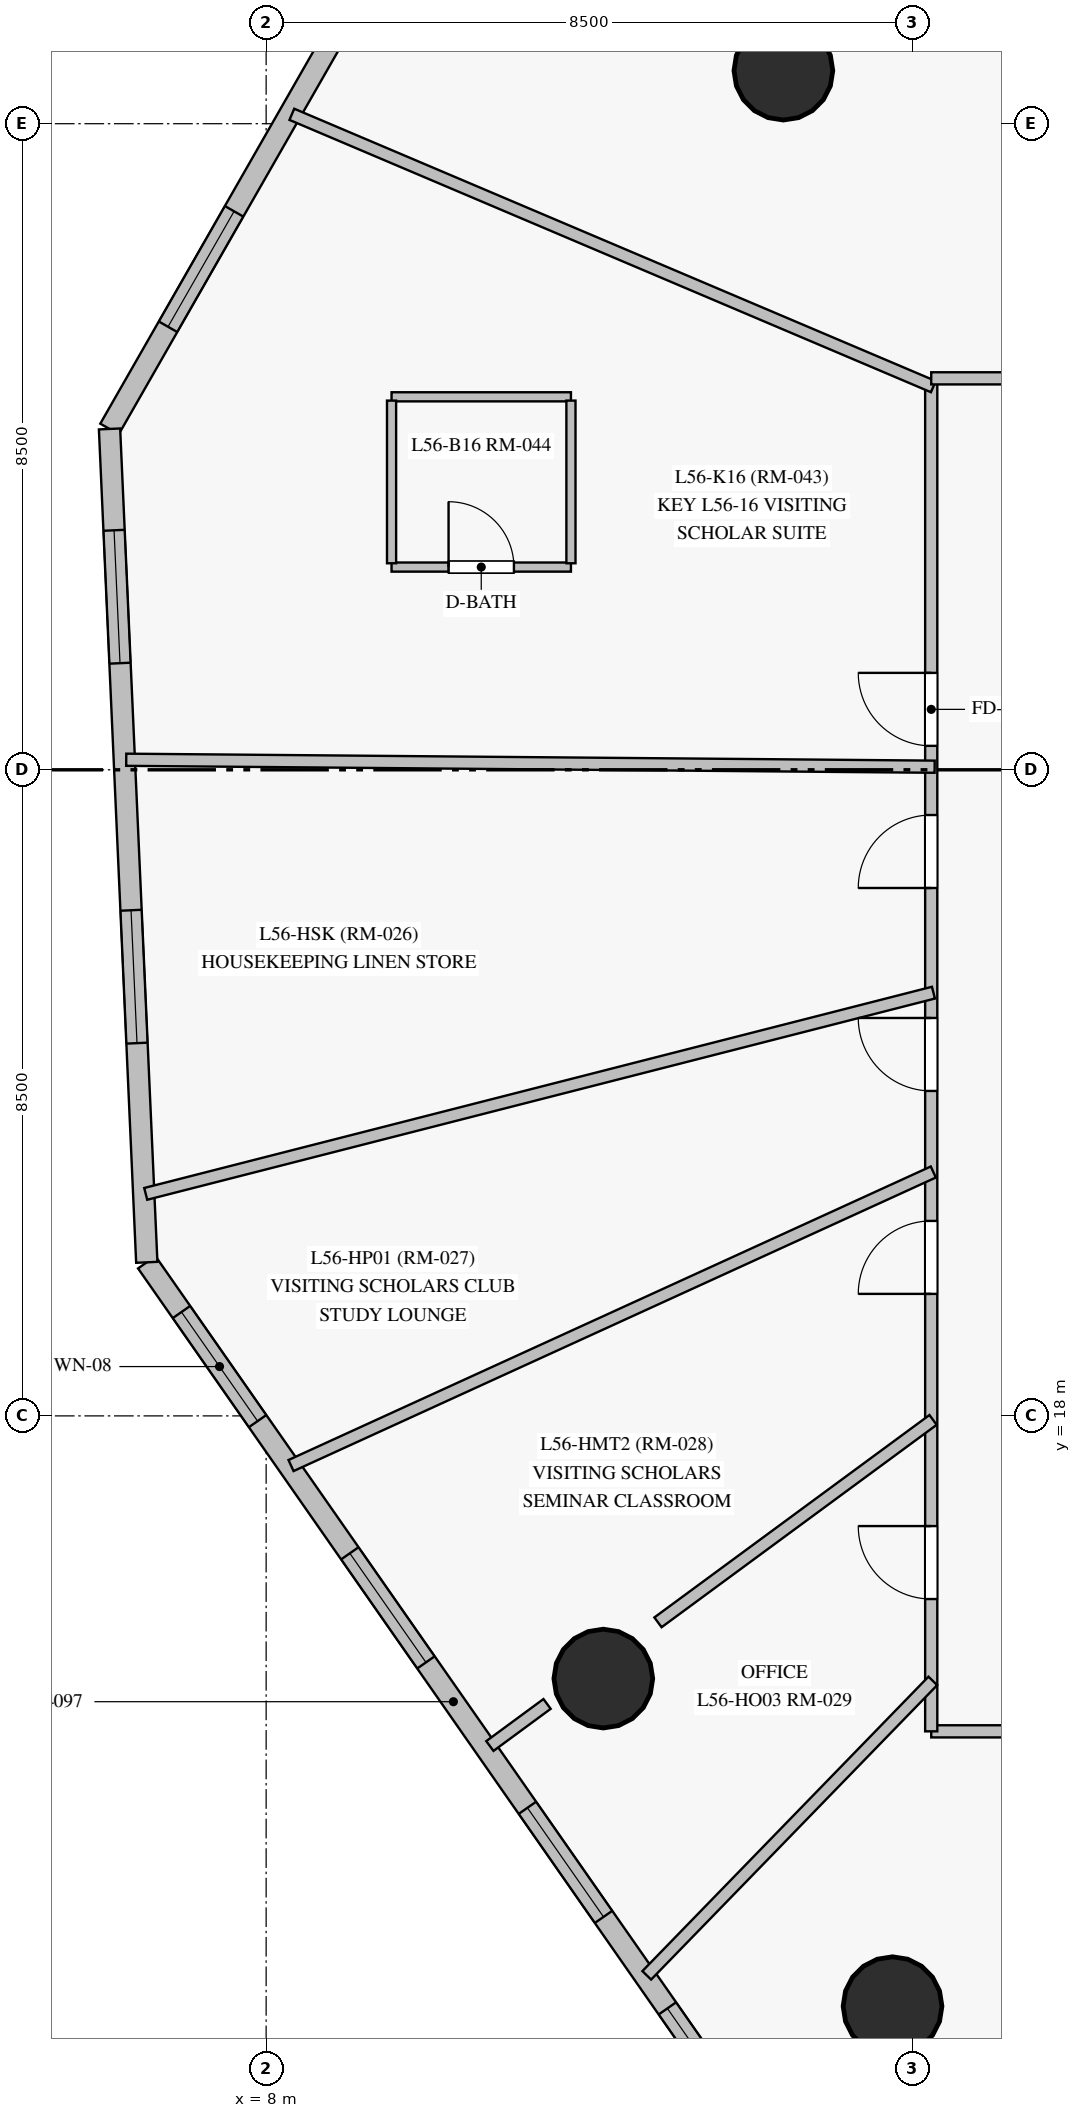
"""IFC4 building model, lengths in metres.
Left out: names, types, materials, properties, quantities, classifications, styles, units other than length and angle.
Written with IfcOpenShell. Run it as: python <this file> out.ifc"""

import sys

from ifc_helpers import new_model, si_unit, direction, frame, frame_2d, origin, origin_with_axes, origin_2d, place, context, subcontext, project, spatial, rectangle, circle, extrude, source, transform, mapped, element, fill, save


model = new_model("IFC4")
c1 = context("Model", 3, precision=1e-05, world=origin(), true_north=direction((0.0, 1.0)))
c2 = subcontext(c1, "Body", "Model", "MODEL_VIEW")
j1 = project(units=[si_unit("LENGTHUNIT", "METRE"), si_unit("PLANEANGLEUNIT", "RADIAN")], contexts=[c1])
p1 = place(None, origin())
s1 = spatial("IfcSite", under=j1, at=p1, CompositionType="ELEMENT")
p2 = place(p1, origin())
s2 = spatial("IfcBuilding", under=s1, at=p2, CompositionType="ELEMENT")
p3 = place(p2, frame((0.0, 0.0, 193.15)))
s3 = spatial("IfcBuildingStorey", under=s2, at=p3, CompositionType="ELEMENT", Elevation=193.15)
m1 = source(origin_with_axes(), c2, "Body", "SweptSolid", [
    extrude(circle(Radius=0.65, at=origin_2d()), origin(), (0.0, 0.0, 1.0), 3.05),
])
for number, where, z_axis, x_axis in (
    (1, (14.805, 35.698, 0.0), (0.0, 0.0, 1.0), (1.0, 0.0, 0.0)),
    (2, (12.436, 14.544, 0.0), (0.0, 0.0, 1.0), (1.0, 0.0, 0.0)),
    (3, (16.241, 10.234, 0.0), (0.0, 0.0, 1.0), (1.0, 0.0, 0.0)),
):
    element("IfcColumn", number, at=place(p3, frame(where, z_axis=z_axis, x_axis=x_axis)), inside=s3, PredefinedType="COLUMN", context=c2, shape_type="MappedRepresentation", body=[
        mapped(m1, transform((0.0, 0.0, 0.0), scale=1.0)),
    ])
p4 = place(p3, frame((6.43, 20.02, 0.0), z_axis=(0.0, 0.0, 1.0), x_axis=(0.57226340273, -0.820069873789, 0.0)))
e4 = element("IfcWall", 4, at=p4, inside=s3, PredefinedType="SOLIDWALL", context=c2, shape_type="SweptSolid", body=[
    extrude(rectangle(XDim=14.097, YDim=0.28, at=frame_2d((7.049, 0.0))), origin(), (0.0, 0.0, 1.0), 2.825),
])
p5 = place(p4, frame((0.797, 0.0, 0.85)))
e5 = element("IfcOpeningElement", 5, at=p5, cuts=e4, PredefinedType="OPENING", context=c2, shape_type="SweptSolid", body=[
    extrude(rectangle(XDim=1.75, YDim=1.65, at=frame_2d((0.875, 0.825))), frame((0.0, 0.15, 0.0), z_axis=(0.0, -1.0, 0.0), x_axis=(1.0, 0.0, 0.0)), (0.0, 0.0, 1.0), 0.3),
])
p6 = place(p4, frame((4.668, 0.0, 0.85)))
e6 = element("IfcOpeningElement", 6, at=p6, cuts=e4, PredefinedType="OPENING", context=c2, shape_type="SweptSolid", body=[
    extrude(rectangle(XDim=1.75, YDim=1.65, at=frame_2d((0.875, 0.825))), frame((0.0, 0.15, 0.0), z_axis=(0.0, -1.0, 0.0), x_axis=(1.0, 0.0, 0.0)), (0.0, 0.0, 1.0), 0.3),
])
p7 = place(p4, frame((8.751, 0.0, 0.85)))
e7 = element("IfcOpeningElement", 7, at=p7, cuts=e4, PredefinedType="OPENING", context=c2, shape_type="SweptSolid", body=[
    extrude(rectangle(XDim=1.75, YDim=1.65, at=frame_2d((0.875, 0.825))), frame((0.0, 0.15, 0.0), z_axis=(0.0, -1.0, 0.0), x_axis=(1.0, 0.0, 0.0)), (0.0, 0.0, 1.0), 0.3),
])
p8 = place(p4, frame((11.969, 0.0, 0.85)))
e8 = element("IfcOpeningElement", 8, at=p8, cuts=e4, PredefinedType="OPENING", context=c2, shape_type="SweptSolid", body=[
    extrude(rectangle(XDim=1.55, YDim=1.65, at=frame_2d((0.775, 0.825))), frame((0.0, 0.15, 0.0), z_axis=(0.0, -1.0, 0.0), x_axis=(1.0, 0.0, 0.0)), (0.0, 0.0, 1.0), 0.3),
])
p9 = place(p3, frame((12.943, 43.219, 0.0), z_axis=(0.0, 0.0, 1.0), x_axis=(-0.496778519018, -0.867877354839, 0.0)))
e9 = element("IfcWall", 9, at=p9, inside=s3, PredefinedType="SOLIDWALL", context=c2, shape_type="SweptSolid", body=[
    extrude(rectangle(XDim=14.097, YDim=0.28, at=frame_2d((7.049, 0.0))), origin(), (0.0, 0.0, 1.0), 2.825),
])
p10 = place(p9, frame((1.657, 0.0, 0.85)))
e10 = element("IfcOpeningElement", 10, at=p10, cuts=e9, PredefinedType="OPENING", context=c2, shape_type="SweptSolid", body=[
    extrude(rectangle(XDim=1.75, YDim=1.65, at=frame_2d((0.875, 0.825))), frame((0.0, 0.15, 0.0), z_axis=(0.0, -1.0, 0.0), x_axis=(1.0, 0.0, 0.0)), (0.0, 0.0, 1.0), 0.3),
])
p11 = place(p9, frame((5.962, 0.0, 0.85)))
e11 = element("IfcOpeningElement", 11, at=p11, cuts=e9, PredefinedType="OPENING", context=c2, shape_type="SweptSolid", body=[
    extrude(rectangle(XDim=1.75, YDim=1.65, at=frame_2d((0.875, 0.825))), frame((0.0, 0.15, 0.0), z_axis=(0.0, -1.0, 0.0), x_axis=(1.0, 0.0, 0.0)), (0.0, 0.0, 1.0), 0.3),
])
p12 = place(p9, frame((10.798, 0.0, 0.85)))
e12 = element("IfcOpeningElement", 12, at=p12, cuts=e9, PredefinedType="OPENING", context=c2, shape_type="SweptSolid", body=[
    extrude(rectangle(XDim=1.75, YDim=1.65, at=frame_2d((0.875, 0.825))), frame((0.0, 0.15, 0.0), z_axis=(0.0, -1.0, 0.0), x_axis=(1.0, 0.0, 0.0)), (0.0, 0.0, 1.0), 0.3),
])
p13 = place(p3, frame((5.94, 30.984, 0.0), z_axis=(0.0, 0.0, 1.0), x_axis=(0.044646804319, -0.999002834262, 0.0)))
e13 = element("IfcWall", 13, at=p13, inside=s3, PredefinedType="SOLIDWALL", context=c2, shape_type="SweptSolid", body=[
    extrude(rectangle(XDim=10.975, YDim=0.28, at=frame_2d((5.487, 0.0))), origin(), (0.0, 0.0, 1.0), 2.825),
])
p14 = place(p13, frame((1.335, 0.0, 0.85)))
e14 = element("IfcOpeningElement", 14, at=p14, cuts=e13, PredefinedType="OPENING", context=c2, shape_type="SweptSolid", body=[
    extrude(rectangle(XDim=1.75, YDim=1.65, at=frame_2d((0.875, 0.825))), frame((0.0, 0.15, 0.0), z_axis=(0.0, -1.0, 0.0), x_axis=(1.0, 0.0, 0.0)), (0.0, 0.0, 1.0), 0.3),
])
p15 = place(p13, frame((6.338, 0.0, 0.85)))
e15 = element("IfcOpeningElement", 15, at=p15, cuts=e13, PredefinedType="OPENING", context=c2, shape_type="SweptSolid", body=[
    extrude(rectangle(XDim=1.75, YDim=1.65, at=frame_2d((0.875, 0.825))), frame((0.0, 0.15, 0.0), z_axis=(0.0, -1.0, 0.0), x_axis=(1.0, 0.0, 0.0)), (0.0, 0.0, 1.0), 0.3),
])
p16 = place(p3, frame((41.8, 13.85, 0.0), z_axis=(0.0, 0.0, 1.0), x_axis=(-1.0, 0.0, 0.0)))
e16 = element("IfcWall", 16, at=p16, inside=s3, PredefinedType="PARTITIONING", context=c2, shape_type="SweptSolid", body=[
    extrude(rectangle(XDim=25.05, YDim=0.16, at=frame_2d((12.525, 0.0))), origin(), (0.0, 0.0, 1.0), 2.275),
])
p17 = place(p16, frame((5.788, 0.0, 0.0)))
e17 = element("IfcOpeningElement", 17, at=p17, cuts=e16, PredefinedType="OPENING", context=c2, shape_type="SweptSolid", body=[
    extrude(rectangle(XDim=0.96, YDim=2.15, at=frame_2d((0.48, 1.075))), frame((0.0, 0.09, 0.0), z_axis=(0.0, -1.0, 0.0), x_axis=(1.0, 0.0, 0.0)), (0.0, 0.0, 1.0), 0.18),
])
p18 = place(p16, frame((18.802, 0.0, 0.0)))
e18 = element("IfcOpeningElement", 18, at=p18, cuts=e16, PredefinedType="OPENING", context=c2, shape_type="SweptSolid", body=[
    extrude(rectangle(XDim=0.96, YDim=2.15, at=frame_2d((0.48, 1.075))), frame((0.0, 0.09, 0.0), z_axis=(0.0, -1.0, 0.0), x_axis=(1.0, 0.0, 0.0)), (0.0, 0.0, 1.0), 0.18),
])
p19 = place(p16, frame((15.808, 0.0, 0.0)))
e19 = element("IfcOpeningElement", 19, at=p19, cuts=e16, PredefinedType="OPENING", context=c2, shape_type="SweptSolid", body=[
    extrude(rectangle(XDim=0.96, YDim=2.15, at=frame_2d((0.48, 1.075))), frame((0.0, 0.09, 0.0), z_axis=(0.0, -1.0, 0.0), x_axis=(1.0, 0.0, 0.0)), (0.0, 0.0, 1.0), 0.18),
])
p20 = place(p16, frame((13.26, 0.0, 0.0)))
e20 = element("IfcOpeningElement", 20, at=p20, cuts=e16, PredefinedType="OPENING", context=c2, shape_type="SweptSolid", body=[
    extrude(rectangle(XDim=0.96, YDim=2.15, at=frame_2d((0.48, 1.075))), frame((0.0, 0.09, 0.0), z_axis=(0.0, -1.0, 0.0), x_axis=(1.0, 0.0, 0.0)), (0.0, 0.0, 1.0), 0.18),
])
p21 = place(p16, frame((11.46, 0.0, 0.0)))
e21 = element("IfcOpeningElement", 21, at=p21, cuts=e16, PredefinedType="OPENING", context=c2, shape_type="SweptSolid", body=[
    extrude(rectangle(XDim=0.96, YDim=2.15, at=frame_2d((0.48, 1.075))), frame((0.0, 0.09, 0.0), z_axis=(0.0, -1.0, 0.0), x_axis=(1.0, 0.0, 0.0)), (0.0, 0.0, 1.0), 0.18),
])
p22 = place(p16, frame((8.202, 0.0, 0.0)))
e22 = element("IfcOpeningElement", 22, at=p22, cuts=e16, PredefinedType="OPENING", context=c2, shape_type="SweptSolid", body=[
    extrude(rectangle(XDim=0.96, YDim=2.15, at=frame_2d((0.48, 1.075))), frame((0.0, 0.09, 0.0), z_axis=(0.0, -1.0, 0.0), x_axis=(1.0, 0.0, 0.0)), (0.0, 0.0, 1.0), 0.18),
])
p23 = place(p3, frame((16.75, 13.85, 0.0), z_axis=(0.0, 0.0, 1.0), x_axis=(0.0, 1.0, 0.0)))
e23 = element("IfcWall", 23, at=p23, inside=s3, PredefinedType="PARTITIONING", context=c2, shape_type="SweptSolid", body=[
    extrude(rectangle(XDim=17.8, YDim=0.16, at=frame_2d((8.9, 0.0))), origin(), (0.0, 0.0, 1.0), 2.375),
])
p24 = place(p23, frame((12.965, 0.0, 0.0)))
e24 = element("IfcOpeningElement", 24, at=p24, cuts=e23, PredefinedType="OPENING", context=c2, shape_type="SweptSolid", body=[
    extrude(rectangle(XDim=0.96, YDim=2.15, at=frame_2d((0.48, 1.075))), frame((0.0, 0.09, 0.0), z_axis=(0.0, -1.0, 0.0), x_axis=(1.0, 0.0, 0.0)), (0.0, 0.0, 1.0), 0.18),
])
p25 = place(p23, frame((11.095, 0.0, 0.0)))
e25 = element("IfcOpeningElement", 25, at=p25, cuts=e23, PredefinedType="OPENING", context=c2, shape_type="SweptSolid", body=[
    extrude(rectangle(XDim=0.96, YDim=2.15, at=frame_2d((0.48, 1.075))), frame((0.0, 0.09, 0.0), z_axis=(0.0, -1.0, 0.0), x_axis=(1.0, 0.0, 0.0)), (0.0, 0.0, 1.0), 0.18),
])
p26 = place(p23, frame((8.425, 0.0, 0.0)))
e26 = element("IfcOpeningElement", 26, at=p26, cuts=e23, PredefinedType="OPENING", context=c2, shape_type="SweptSolid", body=[
    extrude(rectangle(XDim=0.96, YDim=2.15, at=frame_2d((0.48, 1.075))), frame((0.0, 0.09, 0.0), z_axis=(0.0, -1.0, 0.0), x_axis=(1.0, 0.0, 0.0)), (0.0, 0.0, 1.0), 0.18),
])
p27 = place(p23, frame((5.755, 0.0, 0.0)))
e27 = element("IfcOpeningElement", 27, at=p27, cuts=e23, PredefinedType="OPENING", context=c2, shape_type="SweptSolid", body=[
    extrude(rectangle(XDim=0.96, YDim=2.15, at=frame_2d((0.48, 1.075))), frame((0.0, 0.09, 0.0), z_axis=(0.0, -1.0, 0.0), x_axis=(1.0, 0.0, 0.0)), (0.0, 0.0, 1.0), 0.18),
])
p28 = place(p23, frame((1.74, 0.0, 0.0)))
e28 = element("IfcOpeningElement", 28, at=p28, cuts=e23, PredefinedType="OPENING", context=c2, shape_type="SweptSolid", body=[
    extrude(rectangle(XDim=0.96, YDim=2.15, at=frame_2d((0.48, 1.075))), frame((0.0, 0.09, 0.0), z_axis=(0.0, -1.0, 0.0), x_axis=(1.0, 0.0, 0.0)), (0.0, 0.0, 1.0), 0.18),
])
p29 = place(p3, frame((16.779, 23.568, 0.0), z_axis=(0.0, 0.0, 1.0), x_axis=(-0.968887786479, -0.247500418611, 0.0)))
e29 = element("IfcWall", 29, at=p29, inside=s3, PredefinedType="PARTITIONING", context=c2, shape_type="SweptSolid", body=[
    extrude(rectangle(XDim=10.696, YDim=0.16, at=frame_2d((5.348, 0.0))), origin(), (0.0, 0.0, 1.0), 2.825),
])
p30 = place(p3, frame((6.159, 26.632, 0.0), z_axis=(0.0, 0.0, 1.0), x_axis=(0.999963152013, -0.008584556843, 0.0)))
e30 = element("IfcWall", 30, at=p30, inside=s3, PredefinedType="PARTITIONING", context=c2, shape_type="SweptSolid", body=[
    extrude(rectangle(XDim=10.636, YDim=0.16, at=frame_2d((5.318, 0.0))), origin(), (0.0, 0.0, 1.0), 2.825),
])
p31 = place(p3, frame((16.777, 21.208, 0.0), z_axis=(0.0, 0.0, 1.0), x_axis=(-0.909515920055, -0.415669088539, 0.0)))
e31 = element("IfcWall", 31, at=p31, inside=s3, PredefinedType="PARTITIONING", context=c2, shape_type="SweptSolid", body=[
    extrude(rectangle(XDim=9.291, YDim=0.16, at=frame_2d((4.645, 0.0))), origin(), (0.0, 0.0, 1.0), 2.825),
])
p32 = place(p3, frame((16.778, 31.541, 0.0), z_axis=(0.0, 0.0, 1.0), x_axis=(-0.920503138741, 0.390735168072, 0.0)))
e32 = element("IfcWall", 32, at=p32, inside=s3, PredefinedType="PARTITIONING", context=c2, shape_type="SweptSolid", body=[
    extrude(rectangle(XDim=9.168, YDim=0.16, at=frame_2d((4.584, 0.0))), origin(), (0.0, 0.0, 1.0), 2.825),
])
p33 = place(p3, frame((16.771, 14.514, 0.0), z_axis=(0.0, 0.0, 1.0), x_axis=(-0.696840168134, -0.717226449648, 0.0)))
e33 = element("IfcWall", 33, at=p33, inside=s3, PredefinedType="PARTITIONING", context=c2, shape_type="SweptSolid", body=[
    extrude(rectangle(XDim=5.401, YDim=0.16, at=frame_2d((2.701, 0.0))), origin(), (0.0, 0.0, 1.0), 2.825),
])
p34 = place(p3, frame((16.774, 17.947, 0.0), z_axis=(0.0, 0.0, 1.0), x_axis=(-0.805443512659, -0.592672546956, 0.0)))
e34 = element("IfcWall", 34, at=p34, inside=s3, PredefinedType="PARTITIONING", context=c2, shape_type="SweptSolid", body=[
    extrude(rectangle(XDim=4.493, YDim=0.16, at=frame_2d((2.247, 0.0))), origin(), (0.0, 0.0, 1.0), 2.275),
])
p35 = place(p3, frame((16.75, 31.65, 0.0), z_axis=(0.0, 0.0, 1.0), x_axis=(1.0, 0.0, 0.0)))
e35 = element("IfcWall", 35, at=p35, inside=s3, PredefinedType="PARTITIONING", context=c2, shape_type="SweptSolid", body=[
    extrude(rectangle(XDim=2.543, YDim=0.16, at=frame_2d((1.271, 0.0))), origin(), (0.0, 0.0, 1.0), 2.825),
])
p36 = place(p3, frame((9.65, 29.167, 0.0), z_axis=(0.0, 0.0, 1.0), x_axis=(1.0, 0.0, 0.0)))
e36 = element("IfcWall", 36, at=p36, inside=s3, PredefinedType="PARTITIONING", context=c2, shape_type="SweptSolid", body=[
    extrude(rectangle(XDim=2.36, YDim=0.12, at=frame_2d((1.18, 0.0))), origin(), (0.0, 0.0, 1.0), 2.825),
])
p37 = place(p36, frame((0.75, 0.0, 0.0)))
e37 = element("IfcOpeningElement", 37, at=p37, cuts=e36, PredefinedType="OPENING", context=c2, shape_type="SweptSolid", body=[
    extrude(rectangle(XDim=0.86, YDim=2.1, at=frame_2d((0.43, 1.05))), frame((0.0, 0.07, 0.0), z_axis=(0.0, -1.0, 0.0), x_axis=(1.0, 0.0, 0.0)), (0.0, 0.0, 1.0), 0.14),
])
p38 = place(p3, frame((12.01, 31.407, 0.0), z_axis=(0.0, 0.0, 1.0), x_axis=(-1.0, 0.0, 0.0)))
e38 = element("IfcWall", 38, at=p38, inside=s3, PredefinedType="PARTITIONING", context=c2, shape_type="SweptSolid", body=[
    extrude(rectangle(XDim=2.36, YDim=0.12, at=frame_2d((1.18, 0.0))), origin(), (0.0, 0.0, 1.0), 2.825),
])
for number, where, z_axis, x_axis in (
    (39, (12.01, 29.217, 0.0), (0.0, 0.0, 1.0), (0.0, 1.0, 0.0)),
    (40, (9.65, 31.357, 0.0), (0.0, 0.0, 1.0), (0.0, -1.0, 0.0)),
):
    element("IfcWall", number, at=place(p3, frame(where, z_axis=z_axis, x_axis=x_axis)), inside=s3, PredefinedType="PARTITIONING", context=c2, shape_type="SweptSolid", body=[
        extrude(rectangle(XDim=2.14, YDim=0.12, at=frame_2d((1.07, 0.0))), origin(), (0.0, 0.0, 1.0), 2.825),
    ])
p39 = place(p3, frame((11.696, 14.21, 0.0), z_axis=(0.0, 0.0, 1.0), x_axis=(-0.805423517146, -0.59269971995, 0.0)))
e41 = element("IfcWall", 41, at=p39, inside=s3, PredefinedType="PARTITIONING", context=c2, shape_type="SweptSolid", body=[
    extrude(rectangle(XDim=0.934, YDim=0.16, at=frame_2d((0.467, 0.0))), origin(), (0.0, 0.0, 1.0), 2.825),
])
m2 = source(origin_with_axes(), c2, "Body", "SweptSolid", [
    extrude(rectangle(XDim=1.75, YDim=1.65, at=frame_2d((0.875, 0.825))), frame((0.0, 0.03, 0.0), z_axis=(0.0, -1.0, 0.0), x_axis=(1.0, 0.0, 0.0)), (0.0, 0.0, 1.0), 0.06),
])
p40 = place(p5, origin())
e42 = element("IfcWindow", 42, at=p40, inside=s3, PartitioningType="SINGLE_PANEL", PredefinedType="WINDOW", context=c2, shape_type="MappedRepresentation", body=[
    mapped(m2, transform((0.0, 0.0, 0.0), scale=1.0)),
])
fill(e5, e42)
p41 = place(p6, origin())
e43 = element("IfcWindow", 43, at=p41, inside=s3, PartitioningType="SINGLE_PANEL", PredefinedType="WINDOW", context=c2, shape_type="MappedRepresentation", body=[
    mapped(m2, transform((0.0, 0.0, 0.0), scale=1.0)),
])
fill(e6, e43)
p42 = place(p7, origin())
e44 = element("IfcWindow", 44, at=p42, inside=s3, PartitioningType="SINGLE_PANEL", PredefinedType="WINDOW", context=c2, shape_type="MappedRepresentation", body=[
    mapped(m2, transform((0.0, 0.0, 0.0), scale=1.0)),
])
fill(e7, e44)
m3 = source(origin_with_axes(), c2, "Body", "SweptSolid", [
    extrude(rectangle(XDim=1.55, YDim=1.65, at=frame_2d((0.775, 0.825))), frame((0.0, 0.03, 0.0), z_axis=(0.0, -1.0, 0.0), x_axis=(1.0, 0.0, 0.0)), (0.0, 0.0, 1.0), 0.06),
])
p43 = place(p8, origin())
e45 = element("IfcWindow", 45, at=p43, inside=s3, PartitioningType="SINGLE_PANEL", PredefinedType="WINDOW", context=c2, shape_type="MappedRepresentation", body=[
    mapped(m3, transform((0.0, 0.0, 0.0), scale=1.0)),
])
fill(e8, e45)
p44 = place(p12, origin())
e46 = element("IfcWindow", 46, at=p44, inside=s3, PartitioningType="SINGLE_PANEL", PredefinedType="WINDOW", context=c2, shape_type="MappedRepresentation", body=[
    mapped(m2, transform((0.0, 0.0, 0.0), scale=1.0)),
])
fill(e12, e46)
p45 = place(p14, origin())
e47 = element("IfcWindow", 47, at=p45, inside=s3, PartitioningType="SINGLE_PANEL", PredefinedType="WINDOW", context=c2, shape_type="MappedRepresentation", body=[
    mapped(m2, transform((0.0, 0.0, 0.0), scale=1.0)),
])
fill(e14, e47)
p46 = place(p15, origin())
e48 = element("IfcWindow", 48, at=p46, inside=s3, PartitioningType="SINGLE_PANEL", PredefinedType="WINDOW", context=c2, shape_type="MappedRepresentation", body=[
    mapped(m2, transform((0.0, 0.0, 0.0), scale=1.0)),
])
fill(e15, e48)
m4 = source(origin_with_axes(), c2, "Body", "SweptSolid", [
    extrude(rectangle(XDim=0.86, YDim=2.1, at=frame_2d((0.43, 1.05))), frame((0.0, 0.025, 0.0), z_axis=(0.0, -1.0, 0.0), x_axis=(1.0, 0.0, 0.0)), (0.0, 0.0, 1.0), 0.05),
])
p47 = place(p37, origin())
e49 = element("IfcDoor", 49, at=p47, inside=s3, OperationType="SINGLE_SWING_LEFT", PredefinedType="DOOR", context=c2, shape_type="MappedRepresentation", body=[
    mapped(m4, transform((0.0, 0.0, 0.0), scale=1.0)),
])
fill(e37, e49)
m5 = source(origin_with_axes(), c2, "Body", "SweptSolid", [
    extrude(rectangle(XDim=0.96, YDim=2.15, at=frame_2d((0.48, 1.075))), frame((0.0, 0.025, 0.0), z_axis=(0.0, -1.0, 0.0), x_axis=(1.0, 0.0, 0.0)), (0.0, 0.0, 1.0), 0.05),
])
p48 = place(p24, origin())
e50 = element("IfcDoor", 50, at=p48, inside=s3, OperationType="SINGLE_SWING_RIGHT", PredefinedType="DOOR", context=c2, shape_type="MappedRepresentation", body=[
    mapped(m5, transform((0.0, 0.0, 0.0), scale=1.0)),
])
fill(e24, e50)
p49 = place(p25, origin())
e51 = element("IfcDoor", 51, at=p49, inside=s3, OperationType="SINGLE_SWING_LEFT", PredefinedType="DOOR", context=c2, shape_type="MappedRepresentation", body=[
    mapped(m5, transform((0.0, 0.0, 0.0), scale=1.0)),
])
fill(e25, e51)
p50 = place(p26, origin())
e52 = element("IfcDoor", 52, at=p50, inside=s3, OperationType="SINGLE_SWING_RIGHT", PredefinedType="DOOR", context=c2, shape_type="MappedRepresentation", body=[
    mapped(m5, transform((0.0, 0.0, 0.0), scale=1.0)),
])
fill(e26, e52)
p51 = place(p27, origin())
e53 = element("IfcDoor", 53, at=p51, inside=s3, OperationType="SINGLE_SWING_LEFT", PredefinedType="DOOR", context=c2, shape_type="MappedRepresentation", body=[
    mapped(m5, transform((0.0, 0.0, 0.0), scale=1.0)),
])
fill(e27, e53)
p52 = place(p28, origin())
e54 = element("IfcDoor", 54, at=p52, inside=s3, OperationType="SINGLE_SWING_RIGHT", PredefinedType="DOOR", context=c2, shape_type="MappedRepresentation", body=[
    mapped(m5, transform((0.0, 0.0, 0.0), scale=1.0)),
])
fill(e28, e54)
save(model, sys.argv[1])
